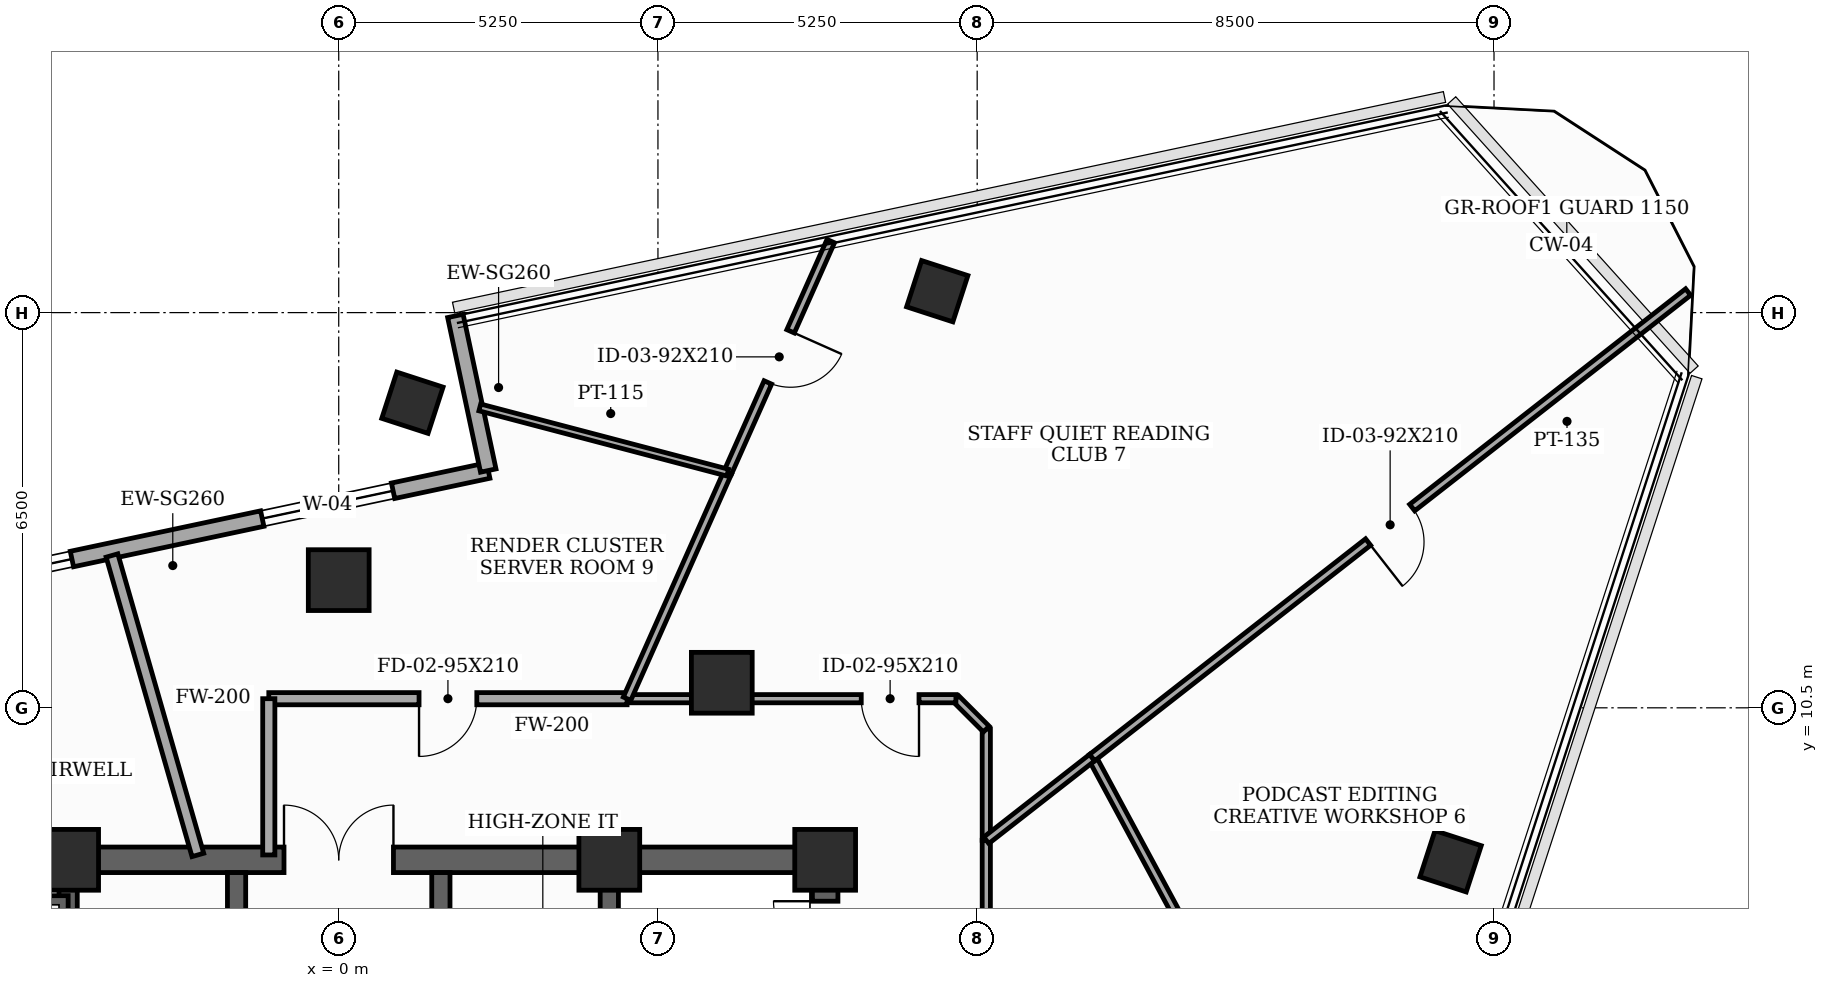
"""IFC4 building model, lengths in metres.
Left out: names, types, materials, properties, quantities, classifications, styles, units other than length and angle.
Written with IfcOpenShell. Run it as: python <this file> out.ifc"""

import sys

from ifc_helpers import new_model, si_unit, direction, frame, frame_2d, origin, origin_2d, place, context, subcontext, project, spatial, rectangle, extrude, element, fill, save


model = new_model("IFC4")
c1 = context("Model", 3, precision=1e-05, world=origin(), true_north=direction((0.0, 1.0)))
c2 = subcontext(c1, "Body", "Model", "MODEL_VIEW")
j1 = project(units=[si_unit("LENGTHUNIT", "METRE"), si_unit("PLANEANGLEUNIT", "RADIAN")], contexts=[c1])
p1 = place(None, origin())
s1 = spatial("IfcSite", under=j1, at=p1, CompositionType="ELEMENT")
p2 = place(p1, origin())
s2 = spatial("IfcBuilding", under=s1, at=p2, CompositionType="ELEMENT")
p3 = place(p2, frame((0.0, 0.0, 301.7)))
s3 = spatial("IfcBuildingStorey", under=s2, at=p3, CompositionType="ELEMENT", Elevation=301.7)
for number, where, z_axis, x_axis in (
    (1, (8.0, 8.0, 0.0), (0.0, 0.0, 1.0), (1.0, 0.0, 0.0)),
    (2, (4.45, 8.0, 0.0), (0.0, 0.0, 1.0), (1.0, 0.0, 0.0)),
    (3, (-4.45, 8.0, 0.0), (0.0, 0.0, 1.0), (1.0, 0.0, 0.0)),
    (4, (6.3, 10.912, 0.0), (0.0, 0.0, 1.0), (1.0, 0.0, 0.0)),
    (5, (0.0, 12.6, 0.0), (0.0, 0.0, 1.0), (1.0, 0.0, 0.0)),
):
    element("IfcColumn", number, at=place(p3, frame(where, z_axis=z_axis, x_axis=x_axis)), inside=s3, PredefinedType="COLUMN", context=c2, shape_type="SweptSolid", body=[
        extrude(rectangle(XDim=1.0, YDim=1.0, at=origin_2d()), origin(), (0.0, 0.0, 1.0), 3.7),
    ])
for number, where, z_axis, x_axis in (
    (6, (18.286, 7.976, 0.0), (0.0, 0.0, 1.0), (0.309, 0.951, 0.0)),
    (7, (9.844, 17.352, 0.0), (0.0, 0.0, 1.0), (0.309, 0.951, 0.0)),
    (8, (1.212, 15.518, 0.0), (0.0, 0.0, 1.0), (0.309, 0.951, 0.0)),
):
    element("IfcColumn", number, at=place(p3, frame(where, z_axis=z_axis, x_axis=x_axis)), inside=s3, PredefinedType="COLUMN", context=c2, shape_type="SweptSolid", body=[
        extrude(rectangle(XDim=0.8, YDim=0.8, at=origin_2d()), origin(), (0.0, 0.0, 1.0), 3.7),
    ])
p4 = place(p3, frame((2.459, 14.402, 0.0), z_axis=(0.0, 0.0, 1.0), x_axis=(-0.978149082982, -0.207904717268, 0.0)))
e9 = element("IfcWall", 9, at=p4, inside=s3, PredefinedType="SOLIDWALL", context=c2, shape_type="SweptSolid", body=[
    extrude(rectangle(XDim=10.8, YDim=0.26, at=frame_2d((5.4, 0.0))), origin(), (0.0, 0.0, 1.0), 3.5),
])
p5 = place(p4, frame((1.6, 0.0, 0.85)))
e10 = element("IfcOpeningElement", 10, at=p5, cuts=e9, PredefinedType="OPENING", context=c2, shape_type="SweptSolid", body=[
    extrude(rectangle(XDim=2.2, YDim=1.25, at=frame_2d((1.1, 0.625))), frame((0.0, 0.14, 0.0), z_axis=(0.0, -1.0, 0.0), x_axis=(1.0, 0.0, 0.0)), (0.0, 0.0, 1.0), 0.28),
])
p6 = place(p4, frame((7.0, 0.0, 0.85)))
e11 = element("IfcOpeningElement", 11, at=p6, cuts=e9, PredefinedType="OPENING", context=c2, shape_type="SweptSolid", body=[
    extrude(rectangle(XDim=2.2, YDim=1.25, at=frame_2d((1.1, 0.625))), frame((0.0, 0.14, 0.0), z_axis=(0.0, -1.0, 0.0), x_axis=(1.0, 0.0, 0.0)), (0.0, 0.0, 1.0), 0.28),
])
p7 = place(p3, frame((1.919, 16.946, 0.0), z_axis=(0.0, 0.0, 1.0), x_axis=(0.207893569688, -0.978151452323, 0.0)))
e12 = element("IfcWall", 12, at=p7, inside=s3, PredefinedType="SOLIDWALL", context=c2, shape_type="SweptSolid", body=[
    extrude(rectangle(XDim=2.6, YDim=0.26, at=frame_2d((1.3, 0.0))), origin(), (0.0, 0.0, 1.0), 3.5),
])
p8 = place(p3, frame((8.0, -8.0, 0.0), z_axis=(0.0, 0.0, 1.0), x_axis=(0.0, 1.0, 0.0)))
e13 = element("IfcWall", 13, at=p8, inside=s3, PredefinedType="SHEAR", context=c2, shape_type="SweptSolid", body=[
    extrude(rectangle(XDim=16.0, YDim=0.42, at=frame_2d((8.0, 0.0))), origin(), (0.0, 0.0, 1.0), 3.5),
])
p9 = place(p8, frame((9.6, 0.0, 0.0)))
e14 = element("IfcOpeningElement", 14, at=p9, cuts=e13, PredefinedType="OPENING", context=c2, shape_type="SweptSolid", body=[
    extrude(rectangle(XDim=1.05, YDim=2.15, at=frame_2d((0.525, 1.075))), frame((0.0, 0.22, 0.0), z_axis=(0.0, -1.0, 0.0), x_axis=(1.0, 0.0, 0.0)), (0.0, 0.0, 1.0), 0.44),
])
p10 = place(p8, frame((14.469, 0.0, 0.0)))
e15 = element("IfcOpeningElement", 15, at=p10, cuts=e13, PredefinedType="OPENING", context=c2, shape_type="SweptSolid", body=[
    extrude(rectangle(XDim=0.85, YDim=2.02, at=frame_2d((0.425, 1.01))), frame((0.0, 0.22, 0.0), z_axis=(0.0, -1.0, 0.0), x_axis=(1.0, 0.0, 0.0)), (0.0, 0.0, 1.0), 0.44),
])
p11 = place(p3, frame((-8.0, 8.0, 0.0), z_axis=(0.0, 0.0, 1.0), x_axis=(1.0, 0.0, 0.0)))
e16 = element("IfcWall", 16, at=p11, inside=s3, PredefinedType="SHEAR", context=c2, shape_type="SweptSolid", body=[
    extrude(rectangle(XDim=16.0, YDim=0.42, at=frame_2d((8.0, 0.0))), origin(), (0.0, 0.0, 1.0), 3.5),
])
p12 = place(p11, frame((7.1, 0.0, 0.0)))
e17 = element("IfcOpeningElement", 17, at=p12, cuts=e16, PredefinedType="OPENING", context=c2, shape_type="SweptSolid", body=[
    extrude(rectangle(XDim=1.8, YDim=2.15, at=frame_2d((0.9, 1.075))), frame((0.0, 0.22, 0.0), z_axis=(0.0, -1.0, 0.0), x_axis=(1.0, 0.0, 0.0)), (0.0, 0.0, 1.0), 0.44),
])
for number, where, z_axis, x_axis in (
    (18, (-4.45, -7.79, 0.0), (0.0, 0.0, 1.0), (0.0, 1.0, 0.0)),
    (19, (4.45, -7.79, 0.0), (0.0, 0.0, 1.0), (0.0, 1.0, 0.0)),
):
    element("IfcWall", number, at=place(p3, frame(where, z_axis=z_axis, x_axis=x_axis)), inside=s3, PredefinedType="SHEAR", context=c2, shape_type="SweptSolid", body=[
        extrude(rectangle(XDim=15.58, YDim=0.3, at=frame_2d((7.79, 0.0))), origin(), (0.0, 0.0, 1.0), 3.5),
    ])
p13 = place(p3, frame((-7.79, 7.26, 0.0), z_axis=(0.0, 0.0, 1.0), x_axis=(1.0, 0.0, 0.0)))
e20 = element("IfcWall", 20, at=p13, inside=s3, PredefinedType="SHEAR", context=c2, shape_type="SweptSolid", body=[
    extrude(rectangle(XDim=3.34, YDim=0.3, at=frame_2d((1.67, 0.0))), origin(), (0.0, 0.0, 1.0), 3.5),
])
p14 = place(p3, frame((-1.68, -4.85, 0.0), z_axis=(0.0, 0.0, 1.0), x_axis=(0.0, 1.0, 0.0)))
e21 = element("IfcWall", 21, at=p14, inside=s3, PredefinedType="SHEAR", context=c2, shape_type="SweptSolid", body=[
    extrude(rectangle(XDim=12.64, YDim=0.3, at=frame_2d((6.32, 0.0))), origin(), (0.0, 0.0, 1.0), 3.5),
])
p15 = place(p14, frame((3.5, 0.0, 0.0)))
e22 = element("IfcOpeningElement", 22, at=p15, cuts=e21, PredefinedType="OPENING", context=c2, shape_type="SweptSolid", body=[
    extrude(rectangle(XDim=0.95, YDim=2.1, at=frame_2d((0.475, 1.05))), frame((0.0, 0.16, 0.0), z_axis=(0.0, -1.0, 0.0), x_axis=(1.0, 0.0, 0.0)), (0.0, 0.0, 1.0), 0.32),
])
p16 = place(p14, frame((9.8, 0.0, 0.0)))
e23 = element("IfcOpeningElement", 23, at=p16, cuts=e21, PredefinedType="OPENING", context=c2, shape_type="SweptSolid", body=[
    extrude(rectangle(XDim=0.95, YDim=2.1, at=frame_2d((0.475, 1.05))), frame((0.0, 0.16, 0.0), z_axis=(0.0, -1.0, 0.0), x_axis=(1.0, 0.0, 0.0)), (0.0, 0.0, 1.0), 0.32),
])
p17 = place(p3, frame((1.68, -4.85, 0.0), z_axis=(0.0, 0.0, 1.0), x_axis=(0.0, 1.0, 0.0)))
e24 = element("IfcWall", 24, at=p17, inside=s3, PredefinedType="SHEAR", context=c2, shape_type="SweptSolid", body=[
    extrude(rectangle(XDim=12.64, YDim=0.3, at=frame_2d((6.32, 0.0))), origin(), (0.0, 0.0, 1.0), 3.5),
])
p18 = place(p17, frame((0.55, 0.0, 0.0)))
e25 = element("IfcOpeningElement", 25, at=p18, cuts=e24, PredefinedType="OPENING", context=c2, shape_type="SweptSolid", body=[
    extrude(rectangle(XDim=1.1, YDim=2.1, at=frame_2d((0.55, 1.05))), frame((0.0, 0.16, 0.0), z_axis=(0.0, -1.0, 0.0), x_axis=(1.0, 0.0, 0.0)), (0.0, 0.0, 1.0), 0.32),
])
p19 = place(p17, frame((2.65, 0.0, 0.0)))
e26 = element("IfcOpeningElement", 26, at=p19, cuts=e24, PredefinedType="OPENING", context=c2, shape_type="SweptSolid", body=[
    extrude(rectangle(XDim=1.1, YDim=2.1, at=frame_2d((0.55, 1.05))), frame((0.0, 0.16, 0.0), z_axis=(0.0, -1.0, 0.0), x_axis=(1.0, 0.0, 0.0)), (0.0, 0.0, 1.0), 0.32),
])
p20 = place(p17, frame((4.75, 0.0, 0.0)))
e27 = element("IfcOpeningElement", 27, at=p20, cuts=e24, PredefinedType="OPENING", context=c2, shape_type="SweptSolid", body=[
    extrude(rectangle(XDim=1.1, YDim=2.1, at=frame_2d((0.55, 1.05))), frame((0.0, 0.16, 0.0), z_axis=(0.0, -1.0, 0.0), x_axis=(1.0, 0.0, 0.0)), (0.0, 0.0, 1.0), 0.32),
])
p21 = place(p17, frame((6.8, 0.0, 0.0)))
e28 = element("IfcOpeningElement", 28, at=p21, cuts=e24, PredefinedType="OPENING", context=c2, shape_type="SweptSolid", body=[
    extrude(rectangle(XDim=0.92, YDim=2.1, at=frame_2d((0.46, 1.05))), frame((0.0, 0.16, 0.0), z_axis=(0.0, -1.0, 0.0), x_axis=(1.0, 0.0, 0.0)), (0.0, 0.0, 1.0), 0.32),
])
p22 = place(p17, frame((9.8, 0.0, 0.0)))
e29 = element("IfcOpeningElement", 29, at=p22, cuts=e24, PredefinedType="OPENING", context=c2, shape_type="SweptSolid", body=[
    extrude(rectangle(XDim=0.95, YDim=2.1, at=frame_2d((0.475, 1.05))), frame((0.0, 0.16, 0.0), z_axis=(0.0, -1.0, 0.0), x_axis=(1.0, 0.0, 0.0)), (0.0, 0.0, 1.0), 0.32),
])
p23 = place(p3, frame((10.65, 4.225, 0.0), z_axis=(0.0, 0.0, 1.0), x_axis=(0.0, 1.0, 0.0)))
e30 = element("IfcWall", 30, at=p23, inside=s3, PredefinedType="PARTITIONING", context=c2, shape_type="SweptSolid", body=[
    extrude(rectangle(XDim=4.096, YDim=0.135, at=frame_2d((2.048, 0.0))), origin(), (0.0, 0.0, 1.0), 2.885),
])
p24 = place(p3, frame((10.65, 8.321, 0.0), z_axis=(0.0, 0.0, 1.0), x_axis=(0.0, 1.0, 0.0)))
e31 = element("IfcWall", 31, at=p24, inside=s3, PredefinedType="PARTITIONING", context=c2, shape_type="SweptSolid", body=[
    extrude(rectangle(XDim=1.829, YDim=0.135, at=frame_2d((0.915, 0.0))), origin(), (0.0, 0.0, 1.0), 3.5),
])
p25 = place(p3, frame((10.65, 10.15, 0.0), z_axis=(0.0, 0.0, 1.0), x_axis=(-0.707106781187, 0.707106781187, 0.0)))
e32 = element("IfcWall", 32, at=p25, inside=s3, PredefinedType="PARTITIONING", context=c2, shape_type="SweptSolid", body=[
    extrude(rectangle(XDim=0.707, YDim=0.135, at=frame_2d((0.354, 0.0))), origin(), (0.0, 0.0, 1.0), 3.5),
])
p26 = place(p3, frame((10.15, 10.65, 0.0), z_axis=(0.0, 0.0, 1.0), x_axis=(-1.0, 0.0, 0.0)))
e33 = element("IfcWall", 33, at=p26, inside=s3, PredefinedType="PARTITIONING", context=c2, shape_type="SweptSolid", body=[
    extrude(rectangle(XDim=5.408, YDim=0.135, at=frame_2d((2.704, 0.0))), origin(), (0.0, 0.0, 1.0), 2.885),
])
p27 = place(p26, frame((0.607, 0.0, 0.0)))
e34 = element("IfcOpeningElement", 34, at=p27, cuts=e33, PredefinedType="OPENING", context=c2, shape_type="SweptSolid", body=[
    extrude(rectangle(XDim=0.95, YDim=2.1, at=frame_2d((0.475, 1.05))), frame((0.0, 0.077, 0.0), z_axis=(0.0, -1.0, 0.0), x_axis=(1.0, 0.0, 0.0)), (0.0, 0.0, 1.0), 0.155),
])
p28 = place(p3, frame((4.742, 10.65, 0.0), z_axis=(0.0, 0.0, 1.0), x_axis=(-1.0, 0.0, 0.0)))
e35 = element("IfcWall", 35, at=p28, inside=s3, PredefinedType="SOLIDWALL", context=c2, shape_type="SweptSolid", body=[
    extrude(rectangle(XDim=5.892, YDim=0.2, at=frame_2d((2.946, 0.0))), origin(), (0.0, 0.0, 1.0), 2.885),
])
p29 = place(p28, frame((2.471, 0.0, 0.0)))
e36 = element("IfcOpeningElement", 36, at=p29, cuts=e35, PredefinedType="OPENING", context=c2, shape_type="SweptSolid", body=[
    extrude(rectangle(XDim=0.95, YDim=2.1, at=frame_2d((0.475, 1.05))), frame((0.0, 0.11, 0.0), z_axis=(0.0, -1.0, 0.0), x_axis=(1.0, 0.0, 0.0)), (0.0, 0.0, 1.0), 0.22),
])
p30 = place(p3, frame((-1.15, 10.65, 0.0), z_axis=(0.0, 0.0, 1.0), x_axis=(0.0, -1.0, 0.0)))
e37 = element("IfcWall", 37, at=p30, inside=s3, PredefinedType="SOLIDWALL", context=c2, shape_type="SweptSolid", body=[
    extrude(rectangle(XDim=2.57, YDim=0.2, at=frame_2d((1.285, 0.0))), origin(), (0.0, 0.0, 1.0), 2.885),
])
p31 = place(p3, frame((15.096, 4.663, 0.0), z_axis=(0.0, 0.0, 1.0), x_axis=(-0.474498198469, 0.88025647379, 0.0)))
e38 = element("IfcWall", 38, at=p31, inside=s3, PredefinedType="PARTITIONING", context=c2, shape_type="SweptSolid", body=[
    extrude(rectangle(XDim=5.7, YDim=0.135, at=frame_2d((2.85, 0.0))), origin(), (0.0, 0.0, 1.0), 3.035),
])
p32 = place(p3, frame((12.391, 9.681, 0.0), z_axis=(0.0, 0.0, 1.0), x_axis=(-0.788124883644, -0.615515367624, 0.0)))
e39 = element("IfcWall", 39, at=p32, inside=s3, PredefinedType="PARTITIONING", context=c2, shape_type="SweptSolid", body=[
    extrude(rectangle(XDim=2.209, YDim=0.135, at=frame_2d((1.104, 0.0))), origin(), (0.0, 0.0, 1.0), 3.5),
])
p33 = place(p3, frame((22.192, 17.338, 0.0), z_axis=(0.0, 0.0, 1.0), x_axis=(-0.788015446076, -0.615655469192, 0.0)))
e40 = element("IfcWall", 40, at=p33, inside=s3, PredefinedType="PARTITIONING", context=c2, shape_type="SweptSolid", body=[
    extrude(rectangle(XDim=12.438, YDim=0.135, at=frame_2d((6.219, 0.0))), origin(), (0.0, 0.0, 1.0), 3.035),
])
p34 = place(p33, frame((5.759, 0.0, 0.0)))
e41 = element("IfcOpeningElement", 41, at=p34, cuts=e40, PredefinedType="OPENING", context=c2, shape_type="SweptSolid", body=[
    extrude(rectangle(XDim=0.92, YDim=2.1, at=frame_2d((0.46, 1.05))), frame((0.0, 0.077, 0.0), z_axis=(0.0, -1.0, 0.0), x_axis=(1.0, 0.0, 0.0)), (0.0, 0.0, 1.0), 0.155),
])
p35 = place(p3, frame((8.092, 18.176, 0.0), z_axis=(0.0, 0.0, 1.0), x_axis=(-0.406654666586, -0.91358195152, 0.0)))
e42 = element("IfcWall", 42, at=p35, inside=s3, PredefinedType="PARTITIONING", context=c2, shape_type="SweptSolid", body=[
    extrude(rectangle(XDim=4.168, YDim=0.135, at=frame_2d((2.084, 0.0))), origin(), (0.0, 0.0, 1.0), 3.035),
])
p36 = place(p35, frame((1.624, 0.0, 0.0)))
e43 = element("IfcOpeningElement", 43, at=p36, cuts=e42, PredefinedType="OPENING", context=c2, shape_type="SweptSolid", body=[
    extrude(rectangle(XDim=0.92, YDim=2.1, at=frame_2d((0.46, 1.05))), frame((0.0, 0.077, 0.0), z_axis=(0.0, -1.0, 0.0), x_axis=(1.0, 0.0, 0.0)), (0.0, 0.0, 1.0), 0.155),
])
p37 = place(p3, frame((6.397, 14.368, 0.0), z_axis=(0.0, 0.0, 1.0), x_axis=(-0.406667169341, -0.913576386177, 0.0)))
e44 = element("IfcWall", 44, at=p37, inside=s3, PredefinedType="PARTITIONING", context=c2, shape_type="SweptSolid", body=[
    extrude(rectangle(XDim=4.07, YDim=0.135, at=frame_2d((2.035, 0.0))), origin(), (0.0, 0.0, 1.0), 2.885),
])
p38 = place(p3, frame((2.32, 15.44, 0.0), z_axis=(0.0, 0.0, 1.0), x_axis=(0.967091789993, -0.254427729874, 0.0)))
e45 = element("IfcWall", 45, at=p38, inside=s3, PredefinedType="PARTITIONING", context=c2, shape_type="SweptSolid", body=[
    extrude(rectangle(XDim=4.215, YDim=0.115, at=frame_2d((2.108, 0.0))), origin(), (0.0, 0.0, 1.0), 3.5),
])
p39 = place(p3, frame((-3.729, 13.005, 0.0), z_axis=(0.0, 0.0, 1.0), x_axis=(0.275658725111, -0.961255568135, 0.0)))
e46 = element("IfcWall", 46, at=p39, inside=s3, PredefinedType="SOLIDWALL", context=c2, shape_type="SweptSolid", body=[
    extrude(rectangle(XDim=5.124, YDim=0.2, at=frame_2d((2.562, 0.0))), origin(), (0.0, 0.0, 1.0), 2.885),
])
p40 = place(p5, origin())
e47 = element("IfcWindow", 47, at=p40, inside=s3, PartitioningType="SINGLE_PANEL", PredefinedType="WINDOW", context=c2, shape_type="SweptSolid", body=[
    extrude(rectangle(XDim=2.2, YDim=1.25, at=frame_2d((1.1, 0.625))), frame((0.0, 0.03, 0.0), z_axis=(0.0, -1.0, 0.0), x_axis=(1.0, 0.0, 0.0)), (0.0, 0.0, 1.0), 0.06),
])
fill(e10, e47)
p41 = place(p6, origin())
e48 = element("IfcWindow", 48, at=p41, inside=s3, PartitioningType="SINGLE_PANEL", PredefinedType="WINDOW", context=c2, shape_type="SweptSolid", body=[
    extrude(rectangle(XDim=2.2, YDim=1.25, at=frame_2d((1.1, 0.625))), frame((0.0, 0.03, 0.0), z_axis=(0.0, -1.0, 0.0), x_axis=(1.0, 0.0, 0.0)), (0.0, 0.0, 1.0), 0.06),
])
fill(e11, e48)
p42 = place(p10, origin())
e49 = element("IfcDoor", 49, at=p42, inside=s3, OperationType="SINGLE_SWING_RIGHT", PredefinedType="TRAPDOOR", context=c2, shape_type="SweptSolid", body=[
    extrude(rectangle(XDim=0.85, YDim=2.02, at=frame_2d((0.425, 1.01))), frame((0.0, 0.025, 0.0), z_axis=(0.0, -1.0, 0.0), x_axis=(1.0, 0.0, 0.0)), (0.0, 0.0, 1.0), 0.05),
])
fill(e15, e49)
p43 = place(p12, origin())
e50 = element("IfcDoor", 50, at=p43, inside=s3, OperationType="DOUBLE_DOOR_SINGLE_SWING", PredefinedType="DOOR", context=c2, shape_type="SweptSolid", body=[
    extrude(rectangle(XDim=1.8, YDim=2.15, at=frame_2d((0.9, 1.075))), frame((0.0, 0.025, 0.0), z_axis=(0.0, -1.0, 0.0), x_axis=(1.0, 0.0, 0.0)), (0.0, 0.0, 1.0), 0.05),
])
fill(e17, e50)
p44 = place(p27, origin())
e51 = element("IfcDoor", 51, at=p44, inside=s3, OperationType="SINGLE_SWING_LEFT", PredefinedType="DOOR", context=c2, shape_type="SweptSolid", body=[
    extrude(rectangle(XDim=0.95, YDim=2.1, at=frame_2d((0.475, 1.05))), frame((0.0, 0.025, 0.0), z_axis=(0.0, -1.0, 0.0), x_axis=(1.0, 0.0, 0.0)), (0.0, 0.0, 1.0), 0.05),
])
fill(e34, e51)
p45 = place(p29, origin())
e52 = element("IfcDoor", 52, at=p45, inside=s3, OperationType="SINGLE_SWING_RIGHT", PredefinedType="DOOR", context=c2, shape_type="SweptSolid", body=[
    extrude(rectangle(XDim=0.95, YDim=2.1, at=frame_2d((0.475, 1.05))), frame((0.0, 0.025, 0.0), z_axis=(0.0, -1.0, 0.0), x_axis=(1.0, 0.0, 0.0)), (0.0, 0.0, 1.0), 0.05),
])
fill(e36, e52)
p46 = place(p34, origin())
e53 = element("IfcDoor", 53, at=p46, inside=s3, OperationType="SINGLE_SWING_RIGHT", PredefinedType="DOOR", context=c2, shape_type="SweptSolid", body=[
    extrude(rectangle(XDim=0.92, YDim=2.1, at=frame_2d((0.46, 1.05))), frame((0.0, 0.025, 0.0), z_axis=(0.0, -1.0, 0.0), x_axis=(1.0, 0.0, 0.0)), (0.0, 0.0, 1.0), 0.05),
])
fill(e41, e53)
p47 = place(p36, origin())
e54 = element("IfcDoor", 54, at=p47, inside=s3, OperationType="SINGLE_SWING_LEFT", PredefinedType="DOOR", context=c2, shape_type="SweptSolid", body=[
    extrude(rectangle(XDim=0.92, YDim=2.1, at=frame_2d((0.46, 1.05))), frame((0.0, 0.025, 0.0), z_axis=(0.0, -1.0, 0.0), x_axis=(1.0, 0.0, 0.0)), (0.0, 0.0, 1.0), 0.05),
])
fill(e43, e54)
save(model, sys.argv[1])
